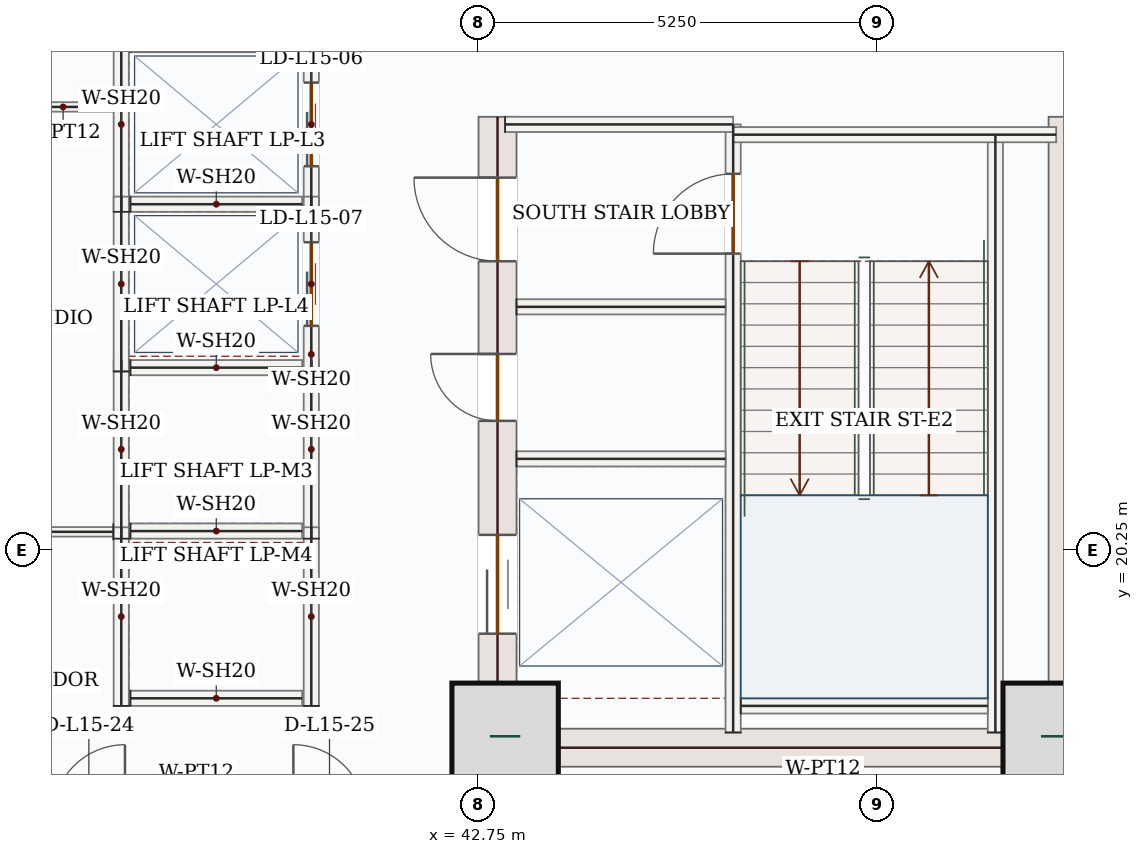
"""IFC4 building model, lengths in metres.
Left out: names, types, materials, properties, quantities, classifications, styles, units other than length and angle.
Written with IfcOpenShell. Run it as: python <this file> out.ifc"""

import sys

from ifc_helpers import new_model, si_unit, direction, frame, frame_2d, origin, origin_2d, place, context, subcontext, project, spatial, rectangle, extrude, source, transform, mapped, element, fill, save


model = new_model("IFC4")
c1 = context("Model", 3, precision=1e-05, world=origin(), true_north=direction((0.0, 1.0)))
c2 = subcontext(c1, "Body", "Model", "MODEL_VIEW")
j1 = project(units=[si_unit("LENGTHUNIT", "METRE"), si_unit("PLANEANGLEUNIT", "RADIAN")], contexts=[c1])
p1 = place(None, origin())
s1 = spatial("IfcSite", under=j1, at=p1, CompositionType="ELEMENT")
p2 = place(p1, origin())
s2 = spatial("IfcBuilding", under=s1, at=p2, CompositionType="ELEMENT")
p3 = place(p2, frame((0.0, 0.0, 71.1)))
s3 = spatial("IfcBuildingStorey", under=s2, at=p3, CompositionType="ELEMENT", Elevation=71.1)
p4 = place(p3, frame((43.0, 17.4, 0.0), z_axis=(0.0, 0.0, 1.0), x_axis=(0.0, 1.0, 0.0)))
e1 = element("IfcWall", 1, at=p4, inside=s3, PredefinedType="SHEAR", context=c2, shape_type="SweptSolid", body=[
    extrude(rectangle(XDim=8.55, YDim=0.5, at=frame_2d((4.275, 0.0))), origin(), (0.0, 0.0, 1.0), 3.95),
])
p5 = place(p4, frame((6.65, 0.0, 0.0)))
e2 = element("IfcOpeningElement", 2, at=p5, cuts=e1, PredefinedType="OPENING", context=c2, shape_type="SweptSolid", body=[
    extrude(rectangle(XDim=1.1, YDim=2.2, at=frame_2d((0.55, 1.1))), frame((0.0, 0.26, 0.0), z_axis=(0.0, -1.0, 0.0), x_axis=(1.0, 0.0, 0.0)), (0.0, 0.0, 1.0), 0.52),
])
p6 = place(p4, frame((1.75, 0.0, 0.0)))
e3 = element("IfcOpeningElement", 3, at=p6, cuts=e1, PredefinedType="OPENING", context=c2, shape_type="SweptSolid", body=[
    extrude(rectangle(XDim=1.3, YDim=2.2, at=frame_2d((0.65, 1.1))), frame((0.0, 0.26, 0.0), z_axis=(0.0, -1.0, 0.0), x_axis=(1.0, 0.0, 0.0)), (0.0, 0.0, 1.0), 0.52),
])
p7 = place(p4, frame((4.55, 0.0, 0.0)))
e4 = element("IfcOpeningElement", 4, at=p7, cuts=e1, PredefinedType="OPENING", context=c2, shape_type="SweptSolid", body=[
    extrude(rectangle(XDim=0.88, YDim=2.1, at=frame_2d((0.44, 1.05))), frame((0.0, 0.26, 0.0), z_axis=(0.0, -1.0, 0.0), x_axis=(1.0, 0.0, 0.0)), (0.0, 0.0, 1.0), 0.52),
])
m1 = source(origin(), c2, "Body", "SweptSolid", [
    extrude(rectangle(XDim=8.55, YDim=0.5, at=frame_2d((4.275, 0.0))), origin(), (0.0, 0.0, 1.0), 3.95),
])
p8 = place(p3, frame((50.5, 17.4, 0.0), z_axis=(0.0, 0.0, 1.0), x_axis=(0.0, 1.0, 0.0)))
e5 = element("IfcWall", 5, at=p8, inside=s3, PredefinedType="SHEAR", context=c2, shape_type="MappedRepresentation", body=[
    mapped(m1, transform((0.0, 0.0, 0.0), x_axis=(1.0, 0.0, 0.0), y_axis=(0.0, 1.0, 0.0), z_axis=(0.0, 0.0, 1.0), scale=1.0)),
])
m2 = source(origin(), c2, "Body", "SweptSolid", [
    extrude(rectangle(XDim=7.0, YDim=0.5, at=frame_2d((3.5, 0.0))), origin(), (0.0, 0.0, 1.0), 3.95),
])
p9 = place(p3, frame((43.25, 17.65, 0.0), z_axis=(0.0, 0.0, 1.0), x_axis=(1.0, 0.0, 0.0)))
e6 = element("IfcWall", 6, at=p9, inside=s3, PredefinedType="SHEAR", context=c2, shape_type="MappedRepresentation", body=[
    mapped(m2, transform((0.0, 0.0, 0.0), x_axis=(1.0, 0.0, 0.0), y_axis=(0.0, 1.0, 0.0), z_axis=(0.0, 0.0, 1.0), scale=1.0)),
])
m3 = source(origin(), c2, "Body", "SweptSolid", [
    extrude(rectangle(XDim=1.4, YDim=1.4, at=origin_2d()), origin(), (0.0, 0.0, 1.0), 4.2),
])
for number, where, z_axis, x_axis in (
    (7, (43.1, 17.8, 0.0), (0.0, 0.0, 1.0), (1.0, 0.0, 0.0)),
    (8, (50.35, 17.8, 0.0), (0.0, 0.0, 1.0), (1.0, 0.0, 0.0)),
):
    element("IfcColumn", number, at=place(p3, frame(where, z_axis=z_axis, x_axis=x_axis)), inside=s3, PredefinedType="COLUMN", context=c2, shape_type="MappedRepresentation", body=[
        mapped(m3, transform((0.0, 0.0, 0.0), x_axis=(1.0, 0.0, 0.0), y_axis=(0.0, 1.0, 0.0), z_axis=(0.0, 0.0, 1.0), scale=1.0)),
    ])
p10 = place(p3, frame((53.06, 18.458, 0.0), z_axis=(0.0, 0.0, 1.0), x_axis=(-0.707106781187, -0.707106781187, 0.0)))
e9 = element("IfcWall", 9, at=p10, inside=s3, PredefinedType="SOLIDWALL", context=c2, shape_type="SweptSolid", body=[
    extrude(rectangle(XDim=5.258, YDim=0.32, at=frame_2d((2.629, 0.0))), origin(), (0.0, 0.0, 1.0), 3.95),
])
p11 = place(p10, frame((1.429, 0.0, 0.85)))
e10 = element("IfcOpeningElement", 10, at=p11, cuts=e9, PredefinedType="OPENING", context=c2, shape_type="SweptSolid", body=[
    extrude(rectangle(XDim=2.4, YDim=1.8, at=frame_2d((1.2, 0.9))), frame((0.0, 0.17, 0.0), z_axis=(0.0, -1.0, 0.0), x_axis=(1.0, 0.0, 0.0)), (0.0, 0.0, 1.0), 0.34),
])
m4 = source(origin(), c2, "Body", "SweptSolid", [
    extrude(rectangle(XDim=7.87, YDim=0.2, at=frame_2d((3.935, 0.0))), origin(), (0.0, 0.0, 1.0), 3.95),
])
p12 = place(p3, frame((49.55, 17.85, 0.0), z_axis=(0.0, 0.0, 1.0), x_axis=(0.0, 1.0, 0.0)))
e11 = element("IfcWall", 11, at=p12, inside=s3, PredefinedType="SOLIDWALL", context=c2, shape_type="MappedRepresentation", body=[
    mapped(m4, transform((0.0, 0.0, 0.0), x_axis=(1.0, 0.0, 0.0), y_axis=(0.0, 1.0, 0.0), z_axis=(0.0, 0.0, 1.0), scale=1.0)),
])
p13 = place(p3, frame((46.1, 17.85, 0.0), z_axis=(0.0, 0.0, 1.0), x_axis=(0.0, 1.0, 0.0)))
e12 = element("IfcWall", 12, at=p13, inside=s3, PredefinedType="SOLIDWALL", context=c2, shape_type="SweptSolid", body=[
    extrude(rectangle(XDim=8.0, YDim=0.2, at=frame_2d((4.0, 0.0))), origin(), (0.0, 0.0, 1.0), 3.95),
])
p14 = place(p13, frame((6.3, 0.0, 0.0)))
e13 = element("IfcOpeningElement", 13, at=p14, cuts=e12, PredefinedType="OPENING", context=c2, shape_type="SweptSolid", body=[
    extrude(rectangle(XDim=1.05, YDim=2.15, at=frame_2d((0.525, 1.075))), frame((0.0, 0.11, 0.0), z_axis=(0.0, -1.0, 0.0), x_axis=(1.0, 0.0, 0.0)), (0.0, 0.0, 1.0), 0.22),
])
m5 = source(origin(), c2, "Body", "SweptSolid", [
    extrude(rectangle(XDim=3.0, YDim=0.2, at=frame_2d((1.5, 0.0))), origin(), (0.0, 0.0, 1.0), 3.95),
])
p15 = place(p3, frame((43.1, 25.85, 0.0), z_axis=(0.0, 0.0, 1.0), x_axis=(1.0, 0.0, 0.0)))
e14 = element("IfcWall", 14, at=p15, inside=s3, PredefinedType="SOLIDWALL", context=c2, shape_type="MappedRepresentation", body=[
    mapped(m5, transform((0.0, 0.0, 0.0), x_axis=(1.0, 0.0, 0.0), y_axis=(0.0, 1.0, 0.0), z_axis=(0.0, 0.0, 1.0), scale=1.0)),
])
m6 = source(origin(), c2, "Body", "SweptSolid", [
    extrude(rectangle(XDim=4.25, YDim=0.2, at=frame_2d((2.125, 0.0))), origin(), (0.0, 0.0, 1.0), 3.95),
])
p16 = place(p3, frame((46.1, 25.715, 0.0), z_axis=(0.0, 0.0, 1.0), x_axis=(1.0, 0.0, 0.0)))
e15 = element("IfcWall", 15, at=p16, inside=s3, PredefinedType="SOLIDWALL", context=c2, shape_type="MappedRepresentation", body=[
    mapped(m6, transform((0.0, 0.0, 0.0), x_axis=(1.0, 0.0, 0.0), y_axis=(0.0, 1.0, 0.0), z_axis=(0.0, 0.0, 1.0), scale=1.0)),
])
m7 = source(origin(), c2, "Body", "SweptSolid", [
    extrude(rectangle(XDim=3.25, YDim=0.2, at=frame_2d((1.625, 0.0))), origin(), (0.0, 0.0, 1.0), 3.95),
])
p17 = place(p3, frame((46.2, 18.2, 0.0), z_axis=(0.0, 0.0, 1.0), x_axis=(1.0, 0.0, 0.0)))
e16 = element("IfcWall", 16, at=p17, inside=s3, PredefinedType="SOLIDWALL", context=c2, shape_type="MappedRepresentation", body=[
    mapped(m7, transform((0.0, 0.0, 0.0), x_axis=(1.0, 0.0, 0.0), y_axis=(0.0, 1.0, 0.0), z_axis=(0.0, 0.0, 1.0), scale=1.0)),
])
m8 = source(origin(), c2, "Body", "SweptSolid", [
    extrude(rectangle(XDim=2.75, YDim=0.2, at=frame_2d((1.375, 0.0))), origin(), (0.0, 0.0, 1.0), 3.95),
])
for number, where, z_axis, x_axis in (
    (17, (43.25, 23.45, 0.0), (0.0, 0.0, 1.0), (1.0, 0.0, 0.0)),
    (18, (43.25, 21.45, 0.0), (0.0, 0.0, 1.0), (1.0, 0.0, 0.0)),
):
    element("IfcWall", number, at=place(p3, frame(where, z_axis=z_axis, x_axis=x_axis)), inside=s3, PredefinedType="SOLIDWALL", context=c2, shape_type="MappedRepresentation", body=[
        mapped(m8, transform((0.0, 0.0, 0.0), x_axis=(1.0, 0.0, 0.0), y_axis=(0.0, 1.0, 0.0), z_axis=(0.0, 0.0, 1.0), scale=1.0)),
    ])
m9 = source(origin(), c2, "Body", "SweptSolid", [
    extrude(rectangle(XDim=2.35, YDim=0.2, at=frame_2d((1.175, 0.0))), origin(), (0.0, 0.0, 1.0), 3.95),
])
for number, where, z_axis, x_axis in (
    (19, (38.05, 20.4, 0.0), (0.0, 0.0, 1.0), (0.0, 1.0, 0.0)),
    (20, (40.55, 20.4, 0.0), (0.0, 0.0, 1.0), (0.0, 1.0, 0.0)),
):
    element("IfcWall", number, at=place(p3, frame(where, z_axis=z_axis, x_axis=x_axis)), inside=s3, PredefinedType="SOLIDWALL", context=c2, shape_type="MappedRepresentation", body=[
        mapped(m9, transform((0.0, 0.0, 0.0), x_axis=(1.0, 0.0, 0.0), y_axis=(0.0, 1.0, 0.0), z_axis=(0.0, 0.0, 1.0), scale=1.0)),
    ])
m10 = source(origin(), c2, "Body", "SweptSolid", [
    extrude(rectangle(XDim=2.26, YDim=0.2, at=frame_2d((1.13, 0.0))), origin(), (0.0, 0.0, 1.0), 3.95),
])
for number, where, z_axis, x_axis in (
    (21, (38.17, 20.5, 0.0), (0.0, 0.0, 1.0), (1.0, 0.0, 0.0)),
    (22, (38.17, 22.65, 0.0), (0.0, 0.0, 1.0), (1.0, 0.0, 0.0)),
):
    element("IfcWall", number, at=place(p3, frame(where, z_axis=z_axis, x_axis=x_axis)), inside=s3, PredefinedType="SOLIDWALL", context=c2, shape_type="MappedRepresentation", body=[
        mapped(m10, transform((0.0, 0.0, 0.0), x_axis=(1.0, 0.0, 0.0), y_axis=(0.0, 1.0, 0.0), z_axis=(0.0, 0.0, 1.0), scale=1.0)),
    ])
for number, where, z_axis, x_axis in (
    (23, (38.05, 18.2, 0.0), (0.0, 0.0, 1.0), (0.0, 1.0, 0.0)),
    (24, (40.55, 18.2, 0.0), (0.0, 0.0, 1.0), (0.0, 1.0, 0.0)),
):
    element("IfcWall", number, at=place(p3, frame(where, z_axis=z_axis, x_axis=x_axis)), inside=s3, PredefinedType="SOLIDWALL", context=c2, shape_type="MappedRepresentation", body=[
        mapped(m9, transform((0.0, 0.0, 0.0), x_axis=(1.0, 0.0, 0.0), y_axis=(0.0, 1.0, 0.0), z_axis=(0.0, 0.0, 1.0), scale=1.0)),
    ])
p18 = place(p3, frame((38.17, 18.3, 0.0), z_axis=(0.0, 0.0, 1.0), x_axis=(1.0, 0.0, 0.0)))
e25 = element("IfcWall", 25, at=p18, inside=s3, PredefinedType="SOLIDWALL", context=c2, shape_type="MappedRepresentation", body=[
    mapped(m10, transform((0.0, 0.0, 0.0), x_axis=(1.0, 0.0, 0.0), y_axis=(0.0, 1.0, 0.0), z_axis=(0.0, 0.0, 1.0), scale=1.0)),
])
m11 = source(origin(), c2, "Body", "SweptSolid", [
    extrude(rectangle(XDim=2.3, YDim=0.2, at=frame_2d((1.15, 0.0))), origin(), (0.0, 0.0, 1.0), 3.95),
])
p19 = place(p3, frame((38.05, 24.7, 0.0), z_axis=(0.0, 0.0, 1.0), x_axis=(0.0, 1.0, 0.0)))
e26 = element("IfcWall", 26, at=p19, inside=s3, PredefinedType="SOLIDWALL", context=c2, shape_type="MappedRepresentation", body=[
    mapped(m11, transform((0.0, 0.0, 0.0), x_axis=(1.0, 0.0, 0.0), y_axis=(0.0, 1.0, 0.0), z_axis=(0.0, 0.0, 1.0), scale=1.0)),
])
p20 = place(p3, frame((40.55, 24.7, 0.0), z_axis=(0.0, 0.0, 1.0), x_axis=(0.0, 1.0, 0.0)))
e27 = element("IfcWall", 27, at=p20, inside=s3, PredefinedType="SOLIDWALL", context=c2, shape_type="SweptSolid", body=[
    extrude(rectangle(XDim=2.3, YDim=0.2, at=frame_2d((1.15, 0.0))), origin(), (0.0, 0.0, 1.0), 3.95),
])
p21 = place(p20, frame((0.6, 0.0, 0.0)))
e28 = element("IfcOpeningElement", 28, at=p21, cuts=e27, PredefinedType="OPENING", context=c2, shape_type="SweptSolid", body=[
    extrude(rectangle(XDim=1.1, YDim=2.15, at=frame_2d((0.55, 1.075))), frame((0.0, 0.11, 0.0), z_axis=(0.0, -1.0, 0.0), x_axis=(1.0, 0.0, 0.0)), (0.0, 0.0, 1.0), 0.22),
])
for number, where, z_axis, x_axis in (
    (29, (38.17, 24.8, 0.0), (0.0, 0.0, 1.0), (1.0, 0.0, 0.0)),
    (30, (38.17, 26.9, 0.0), (0.0, 0.0, 1.0), (1.0, 0.0, 0.0)),
):
    element("IfcWall", number, at=place(p3, frame(where, z_axis=z_axis, x_axis=x_axis)), inside=s3, PredefinedType="SOLIDWALL", context=c2, shape_type="MappedRepresentation", body=[
        mapped(m10, transform((0.0, 0.0, 0.0), x_axis=(1.0, 0.0, 0.0), y_axis=(0.0, 1.0, 0.0), z_axis=(0.0, 0.0, 1.0), scale=1.0)),
    ])
m12 = source(origin(), c2, "Body", "SweptSolid", [
    extrude(rectangle(XDim=2.3, YDim=0.2, at=frame_2d((1.15, 0.0))), origin(), (0.0, 0.0, 1.0), 3.95),
])
p22 = place(p3, frame((38.05, 22.6, 0.0), z_axis=(0.0, 0.0, 1.0), x_axis=(0.0, 1.0, 0.0)))
e31 = element("IfcWall", 31, at=p22, inside=s3, PredefinedType="SOLIDWALL", context=c2, shape_type="MappedRepresentation", body=[
    mapped(m12, transform((0.0, 0.0, 0.0), x_axis=(1.0, 0.0, 0.0), y_axis=(0.0, 1.0, 0.0), z_axis=(0.0, 0.0, 1.0), scale=1.0)),
])
p23 = place(p3, frame((40.55, 22.6, 0.0), z_axis=(0.0, 0.0, 1.0), x_axis=(0.0, 1.0, 0.0)))
e32 = element("IfcWall", 32, at=p23, inside=s3, PredefinedType="SOLIDWALL", context=c2, shape_type="SweptSolid", body=[
    extrude(rectangle(XDim=2.3, YDim=0.2, at=frame_2d((1.15, 0.0))), origin(), (0.0, 0.0, 1.0), 3.95),
])
p24 = place(p23, frame((0.6, 0.0, 0.0)))
e33 = element("IfcOpeningElement", 33, at=p24, cuts=e32, PredefinedType="OPENING", context=c2, shape_type="SweptSolid", body=[
    extrude(rectangle(XDim=1.1, YDim=2.15, at=frame_2d((0.55, 1.075))), frame((0.0, 0.11, 0.0), z_axis=(0.0, -1.0, 0.0), x_axis=(1.0, 0.0, 0.0)), (0.0, 0.0, 1.0), 0.22),
])
p25 = place(p3, frame((34.055, 26.08, 0.0), z_axis=(0.0, 0.0, 1.0), x_axis=(1.0, 0.0, 0.0)))
e34 = element("IfcWall", 34, at=p25, inside=s3, PredefinedType="PARTITIONING", context=c2, shape_type="SweptSolid", body=[
    extrude(rectangle(XDim=3.89, YDim=0.125, at=frame_2d((1.945, 0.0))), origin(), (0.0, 0.0, 1.0), 3.95),
])
p26 = place(p25, frame((1.47, 0.0, 0.0)))
e35 = element("IfcOpeningElement", 35, at=p26, cuts=e34, PredefinedType="OPENING", context=c2, shape_type="SweptSolid", body=[
    extrude(rectangle(XDim=0.95, YDim=2.15, at=frame_2d((0.475, 1.075))), frame((0.0, 0.073, 0.0), z_axis=(0.0, -1.0, 0.0), x_axis=(1.0, 0.0, 0.0)), (0.0, 0.0, 1.0), 0.145),
])
m13 = source(origin(), c2, "Body", "SweptSolid", [
    extrude(rectangle(XDim=3.89, YDim=0.125, at=frame_2d((1.945, 0.0))), origin(), (0.0, 0.0, 1.0), 3.95),
])
p27 = place(p3, frame((37.945, 20.49, 0.0), z_axis=(0.0, 0.0, 1.0), x_axis=(-1.0, 0.0, 0.0)))
e36 = element("IfcWall", 36, at=p27, inside=s3, PredefinedType="PARTITIONING", context=c2, shape_type="MappedRepresentation", body=[
    mapped(m13, transform((0.0, 0.0, 0.0), x_axis=(1.0, 0.0, 0.0), y_axis=(0.0, 1.0, 0.0), z_axis=(0.0, 0.0, 1.0), scale=1.0)),
])
m14 = source(origin(), c2, "Body", "SweptSolid", [
    extrude(rectangle(XDim=1.099, YDim=0.125, at=frame_2d((0.549, 0.0))), origin(), (0.0, 0.0, 1.0), 3.95),
])
p28 = place(p3, frame((46.871, 17.395, 0.0), z_axis=(0.0, 0.0, 1.0), x_axis=(0.750977912422, -0.660327324177, 0.0)))
e37 = element("IfcWall", 37, at=p28, inside=s3, PredefinedType="PARTITIONING", context=c2, shape_type="MappedRepresentation", body=[
    mapped(m14, transform((0.0, 0.0, 0.0), x_axis=(1.0, 0.0, 0.0), y_axis=(0.0, 1.0, 0.0), z_axis=(0.0, 0.0, 1.0), scale=1.0)),
])
m15 = source(origin(), c2, "Body", "SweptSolid", [
    extrude(rectangle(XDim=2.4, YDim=1.8, at=frame_2d((1.2, 0.9))), frame((0.0, 0.03, 0.0), z_axis=(0.0, -1.0, 0.0), x_axis=(1.0, 0.0, 0.0)), (0.0, 0.0, 1.0), 0.06),
])
p29 = place(p11, origin())
e38 = element("IfcWindow", 38, at=p29, inside=s3, PartitioningType="DOUBLE_PANEL_VERTICAL", PredefinedType="WINDOW", context=c2, shape_type="MappedRepresentation", body=[
    mapped(m15, transform((0.0, 0.0, 0.0), x_axis=(1.0, 0.0, 0.0), y_axis=(0.0, 1.0, 0.0), z_axis=(0.0, 0.0, 1.0), scale=1.0)),
])
fill(e10, e38)
m16 = source(origin(), c2, "Body", "SweptSolid", [
    extrude(rectangle(XDim=1.05, YDim=2.15, at=frame_2d((0.525, 1.075))), frame((0.0, 0.025, 0.0), z_axis=(0.0, -1.0, 0.0), x_axis=(1.0, 0.0, 0.0)), (0.0, 0.0, 1.0), 0.05),
])
p30 = place(p14, origin())
e39 = element("IfcDoor", 39, at=p30, inside=s3, OperationType="SINGLE_SWING_LEFT", PredefinedType="DOOR", context=c2, shape_type="MappedRepresentation", body=[
    mapped(m16, transform((0.0, 0.0, 0.0), x_axis=(1.0, 0.0, 0.0), y_axis=(0.0, 1.0, 0.0), z_axis=(0.0, 0.0, 1.0), scale=1.0)),
])
fill(e13, e39)
m17 = source(origin(), c2, "Body", "SweptSolid", [
    extrude(rectangle(XDim=1.1, YDim=2.2, at=frame_2d((0.55, 1.1))), frame((0.0, 0.025, 0.0), z_axis=(0.0, -1.0, 0.0), x_axis=(1.0, 0.0, 0.0)), (0.0, 0.0, 1.0), 0.05),
])
p31 = place(p5, origin())
e40 = element("IfcDoor", 40, at=p31, inside=s3, OperationType="SINGLE_SWING_RIGHT", PredefinedType="DOOR", context=c2, shape_type="MappedRepresentation", body=[
    mapped(m17, transform((0.0, 0.0, 0.0), x_axis=(1.0, 0.0, 0.0), y_axis=(0.0, 1.0, 0.0), z_axis=(0.0, 0.0, 1.0), scale=1.0)),
])
fill(e2, e40)
m18 = source(origin(), c2, "Body", "SweptSolid", [
    extrude(rectangle(XDim=1.3, YDim=2.2, at=frame_2d((0.65, 1.1))), frame((0.0, 0.025, 0.0), z_axis=(0.0, -1.0, 0.0), x_axis=(1.0, 0.0, 0.0)), (0.0, 0.0, 1.0), 0.05),
])
p32 = place(p6, origin())
e41 = element("IfcDoor", 41, at=p32, inside=s3, OperationType="DOUBLE_DOOR_SLIDING", PredefinedType="DOOR", context=c2, shape_type="MappedRepresentation", body=[
    mapped(m18, transform((0.0, 0.0, 0.0), x_axis=(1.0, 0.0, 0.0), y_axis=(0.0, 1.0, 0.0), z_axis=(0.0, 0.0, 1.0), scale=1.0)),
])
fill(e3, e41)
m19 = source(origin(), c2, "Body", "SweptSolid", [
    extrude(rectangle(XDim=0.88, YDim=2.1, at=frame_2d((0.44, 1.05))), frame((0.0, 0.025, 0.0), z_axis=(0.0, -1.0, 0.0), x_axis=(1.0, 0.0, 0.0)), (0.0, 0.0, 1.0), 0.05),
])
p33 = place(p7, origin())
e42 = element("IfcDoor", 42, at=p33, inside=s3, OperationType="SINGLE_SWING_RIGHT", PredefinedType="DOOR", context=c2, shape_type="MappedRepresentation", body=[
    mapped(m19, transform((0.0, 0.0, 0.0), x_axis=(1.0, 0.0, 0.0), y_axis=(0.0, 1.0, 0.0), z_axis=(0.0, 0.0, 1.0), scale=1.0)),
])
fill(e4, e42)
m20 = source(origin(), c2, "Body", "SweptSolid", [
    extrude(rectangle(XDim=1.1, YDim=2.15, at=frame_2d((0.55, 1.075))), frame((0.0, 0.025, 0.0), z_axis=(0.0, -1.0, 0.0), x_axis=(1.0, 0.0, 0.0)), (0.0, 0.0, 1.0), 0.05),
])
p34 = place(p21, origin())
e43 = element("IfcDoor", 43, at=p34, inside=s3, OperationType="DOUBLE_DOOR_SLIDING", PredefinedType="DOOR", context=c2, shape_type="MappedRepresentation", body=[
    mapped(m20, transform((0.0, 0.0, 0.0), x_axis=(1.0, 0.0, 0.0), y_axis=(0.0, 1.0, 0.0), z_axis=(0.0, 0.0, 1.0), scale=1.0)),
])
fill(e28, e43)
p35 = place(p24, origin())
e44 = element("IfcDoor", 44, at=p35, inside=s3, OperationType="DOUBLE_DOOR_SLIDING", PredefinedType="DOOR", context=c2, shape_type="MappedRepresentation", body=[
    mapped(m20, transform((0.0, 0.0, 0.0), x_axis=(1.0, 0.0, 0.0), y_axis=(0.0, 1.0, 0.0), z_axis=(0.0, 0.0, 1.0), scale=1.0)),
])
fill(e33, e44)
save(model, sys.argv[1])
